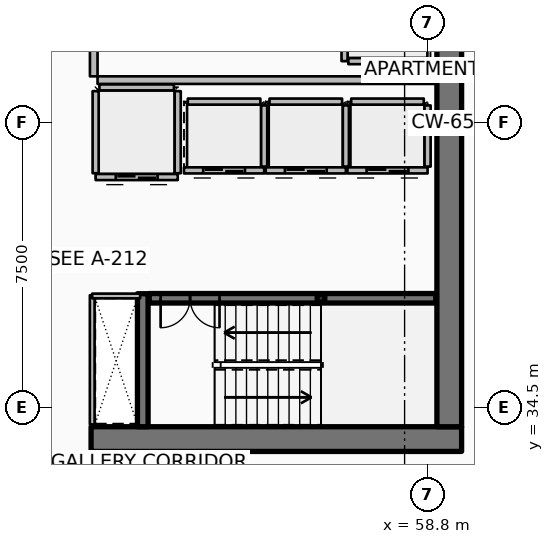
"""IFC4 building model, lengths in metres.
Left out: names, types, materials, properties, quantities, classifications, styles, units other than length and angle.
Written with IfcOpenShell. Run it as: python <this file> out.ifc"""

import sys

from ifc_helpers import new_model, si_unit, direction, frame, frame_2d, origin, origin_2d, place, context, subcontext, project, spatial, rectangle, hollow_rectangle, extrude, element, fill, save


model = new_model("IFC4")
c1 = context("Model", 3, precision=1e-05, world=origin(), true_north=direction((0.0, 1.0)))
c2 = subcontext(c1, "Body", "Model", "MODEL_VIEW")
j1 = project(units=[si_unit("LENGTHUNIT", "METRE"), si_unit("PLANEANGLEUNIT", "RADIAN")], contexts=[c1])
p1 = place(None, origin())
s1 = spatial("IfcSite", under=j1, at=p1, CompositionType="ELEMENT")
p2 = place(p1, origin())
s2 = spatial("IfcBuilding", under=s1, at=p2, CompositionType="ELEMENT")
p3 = place(p2, frame((0.0, 0.0, 252.1)))
s3 = spatial("IfcBuildingStorey", under=s2, at=p3, CompositionType="ELEMENT", Elevation=252.1)
p4 = place(p3, frame((49.95, 33.675, 0.0), z_axis=(0.0, 0.0, 1.0), x_axis=(1.0, 0.0, 0.0)))
e1 = element("IfcWall", 1, at=p4, inside=s3, PredefinedType="SHEAR", context=c2, shape_type="SweptSolid", body=[
    extrude(rectangle(XDim=9.75, YDim=0.65, at=frame_2d((4.875, 0.0))), origin(), (0.0, 0.0, 1.0), 3.85),
])
p5 = place(p3, frame((59.375, 34.0, 0.0), z_axis=(0.0, 0.0, 1.0), x_axis=(0.0, 1.0, 0.0)))
e2 = element("IfcWall", 2, at=p5, inside=s3, PredefinedType="SHEAR", context=c2, shape_type="SweptSolid", body=[
    extrude(rectangle(XDim=16.0, YDim=0.65, at=frame_2d((8.0, 0.0))), origin(), (0.0, 0.0, 1.0), 3.85),
])
p6 = place(p3, frame((51.31, 34.0, 0.0), z_axis=(0.0, 0.0, 1.0), x_axis=(0.0, 1.0, 0.0)))
e3 = element("IfcWall", 3, at=p6, inside=s3, PredefinedType="SHEAR", context=c2, shape_type="SweptSolid", body=[
    extrude(rectangle(XDim=3.5, YDim=0.28, at=frame_2d((1.75, 0.0))), origin(), (0.0, 0.0, 1.0), 3.85),
])
p7 = place(p3, frame((56.0, 37.38, 0.0), z_axis=(0.0, 0.0, 1.0), x_axis=(1.0, 0.0, 0.0)))
e4 = element("IfcColumn", 4, at=p7, inside=s3, PredefinedType="COLUMN", context=c2, shape_type="SweptSolid", body=[
    extrude(hollow_rectangle(XDim=0.2, YDim=0.2, WallThickness=0.01, InnerFilletRadius=0.01, OuterFilletRadius=0.02, at=origin_2d()), origin(), (0.0, 0.0, 1.0), 1.72),
])
p8 = place(p3, frame((51.48, 37.38, 0.0), z_axis=(0.0, 0.0, 1.0), x_axis=(1.0, 0.0, 0.0)))
e5 = element("IfcWall", 5, at=p8, inside=s3, PredefinedType="SOLIDWALL", context=c2, shape_type="SweptSolid", body=[
    extrude(rectangle(XDim=7.54, YDim=0.25, at=frame_2d((3.77, 0.0))), origin(), (0.0, 0.0, 1.0), 3.59),
])
p9 = place(p8, frame((0.3, 0.0, 0.0)))
e6 = element("IfcOpeningElement", 6, at=p9, cuts=e5, PredefinedType="OPENING", context=c2, shape_type="SweptSolid", body=[
    extrude(rectangle(XDim=1.55, YDim=2.15, at=frame_2d((0.775, 1.075))), frame((0.0, 0.135, 0.0), z_axis=(0.0, -1.0, 0.0), x_axis=(1.0, 0.0, 0.0)), (0.0, 0.0, 1.0), 0.27),
])
p10 = place(p3, frame((54.505, 40.745, 0.0), z_axis=(0.0, 0.0, 1.0), x_axis=(-1.0, 0.0, 0.0)))
e7 = element("IfcWall", 7, at=p10, inside=s3, PredefinedType="PARTITIONING", context=c2, shape_type="SweptSolid", body=[
    extrude(rectangle(XDim=2.11, YDim=0.16, at=frame_2d((1.055, 0.0))), origin(), (0.0, 0.0, 1.0), 3.59),
])
p11 = place(p10, frame((0.505, 0.0, 0.0)))
e8 = element("IfcOpeningElement", 8, at=p11, cuts=e7, PredefinedType="OPENING", context=c2, shape_type="SweptSolid", body=[
    extrude(rectangle(XDim=1.1, YDim=2.1, at=frame_2d((0.55, 1.05))), frame((0.0, 0.09, 0.0), z_axis=(0.0, -1.0, 0.0), x_axis=(1.0, 0.0, 0.0)), (0.0, 0.0, 1.0), 0.18),
])
p12 = place(p3, frame((54.505, 40.845, 0.0), z_axis=(0.0, 0.0, 1.0), x_axis=(0.0, 1.0, 0.0)))
e9 = element("IfcWall", 9, at=p12, inside=s3, PredefinedType="PARTITIONING", context=c2, shape_type="SweptSolid", body=[
    extrude(rectangle(XDim=1.61, YDim=0.16, at=frame_2d((0.805, 0.0))), origin(), (0.0, 0.0, 1.0), 3.59),
])
p13 = place(p3, frame((52.495, 42.555, 0.0), z_axis=(0.0, 0.0, 1.0), x_axis=(1.0, 0.0, 0.0)))
e10 = element("IfcWall", 10, at=p13, inside=s3, PredefinedType="PARTITIONING", context=c2, shape_type="SweptSolid", body=[
    extrude(rectangle(XDim=1.91, YDim=0.16, at=frame_2d((0.955, 0.0))), origin(), (0.0, 0.0, 1.0), 3.59),
])
p14 = place(p3, frame((56.655, 40.745, 0.0), z_axis=(0.0, 0.0, 1.0), x_axis=(-1.0, 0.0, 0.0)))
e11 = element("IfcWall", 11, at=p14, inside=s3, PredefinedType="PARTITIONING", context=c2, shape_type="SweptSolid", body=[
    extrude(rectangle(XDim=2.11, YDim=0.16, at=frame_2d((1.055, 0.0))), origin(), (0.0, 0.0, 1.0), 3.59),
])
p15 = place(p14, frame((0.505, 0.0, 0.0)))
e12 = element("IfcOpeningElement", 12, at=p15, cuts=e11, PredefinedType="OPENING", context=c2, shape_type="SweptSolid", body=[
    extrude(rectangle(XDim=1.1, YDim=2.1, at=frame_2d((0.55, 1.05))), frame((0.0, 0.09, 0.0), z_axis=(0.0, -1.0, 0.0), x_axis=(1.0, 0.0, 0.0)), (0.0, 0.0, 1.0), 0.18),
])
p16 = place(p3, frame((56.655, 40.845, 0.0), z_axis=(0.0, 0.0, 1.0), x_axis=(0.0, 1.0, 0.0)))
e13 = element("IfcWall", 13, at=p16, inside=s3, PredefinedType="PARTITIONING", context=c2, shape_type="SweptSolid", body=[
    extrude(rectangle(XDim=1.61, YDim=0.16, at=frame_2d((0.805, 0.0))), origin(), (0.0, 0.0, 1.0), 3.59),
])
p17 = place(p3, frame((54.645, 42.555, 0.0), z_axis=(0.0, 0.0, 1.0), x_axis=(1.0, 0.0, 0.0)))
e14 = element("IfcWall", 14, at=p17, inside=s3, PredefinedType="PARTITIONING", context=c2, shape_type="SweptSolid", body=[
    extrude(rectangle(XDim=1.91, YDim=0.16, at=frame_2d((0.955, 0.0))), origin(), (0.0, 0.0, 1.0), 3.59),
])
p18 = place(p3, frame((58.805, 40.745, 0.0), z_axis=(0.0, 0.0, 1.0), x_axis=(-1.0, 0.0, 0.0)))
e15 = element("IfcWall", 15, at=p18, inside=s3, PredefinedType="PARTITIONING", context=c2, shape_type="SweptSolid", body=[
    extrude(rectangle(XDim=2.11, YDim=0.16, at=frame_2d((1.055, 0.0))), origin(), (0.0, 0.0, 1.0), 3.59),
])
p19 = place(p18, frame((0.505, 0.0, 0.0)))
e16 = element("IfcOpeningElement", 16, at=p19, cuts=e15, PredefinedType="OPENING", context=c2, shape_type="SweptSolid", body=[
    extrude(rectangle(XDim=1.1, YDim=2.1, at=frame_2d((0.55, 1.05))), frame((0.0, 0.09, 0.0), z_axis=(0.0, -1.0, 0.0), x_axis=(1.0, 0.0, 0.0)), (0.0, 0.0, 1.0), 0.18),
])
p20 = place(p3, frame((58.805, 40.845, 0.0), z_axis=(0.0, 0.0, 1.0), x_axis=(0.0, 1.0, 0.0)))
e17 = element("IfcWall", 17, at=p20, inside=s3, PredefinedType="PARTITIONING", context=c2, shape_type="SweptSolid", body=[
    extrude(rectangle(XDim=1.61, YDim=0.16, at=frame_2d((0.805, 0.0))), origin(), (0.0, 0.0, 1.0), 3.59),
])
p21 = place(p3, frame((56.795, 42.555, 0.0), z_axis=(0.0, 0.0, 1.0), x_axis=(1.0, 0.0, 0.0)))
e18 = element("IfcWall", 18, at=p21, inside=s3, PredefinedType="PARTITIONING", context=c2, shape_type="SweptSolid", body=[
    extrude(rectangle(XDim=1.91, YDim=0.16, at=frame_2d((0.955, 0.0))), origin(), (0.0, 0.0, 1.0), 3.59),
])
p22 = place(p3, frame((56.62, 46.08, 0.0), z_axis=(0.0, 0.0, 1.0), x_axis=(0.0, -1.0, 0.0)))
e19 = element("IfcWall", 19, at=p22, inside=s3, PredefinedType="PARTITIONING", context=c2, shape_type="SweptSolid", body=[
    extrude(rectangle(XDim=2.46, YDim=0.16, at=frame_2d((1.23, 0.0))), origin(), (0.0, 0.0, 1.0), 3.59),
])
p23 = place(p22, frame((0.68, 0.0, 0.0)))
e20 = element("IfcOpeningElement", 20, at=p23, cuts=e19, PredefinedType="OPENING", context=c2, shape_type="SweptSolid", body=[
    extrude(rectangle(XDim=1.1, YDim=2.1, at=frame_2d((0.55, 1.05))), frame((0.0, 0.09, 0.0), z_axis=(0.0, -1.0, 0.0), x_axis=(1.0, 0.0, 0.0)), (0.0, 0.0, 1.0), 0.18),
])
p24 = place(p3, frame((56.72, 43.62, 0.0), z_axis=(0.0, 0.0, 1.0), x_axis=(1.0, 0.0, 0.0)))
e21 = element("IfcWall", 21, at=p24, inside=s3, PredefinedType="PARTITIONING", context=c2, shape_type="SweptSolid", body=[
    extrude(rectangle(XDim=2.06, YDim=0.16, at=frame_2d((1.03, 0.0))), origin(), (0.0, 0.0, 1.0), 3.59),
])
p25 = place(p3, frame((52.23, 40.57, 0.0), z_axis=(0.0, 0.0, 1.0), x_axis=(-1.0, 0.0, 0.0)))
e22 = element("IfcWall", 22, at=p25, inside=s3, PredefinedType="PARTITIONING", context=c2, shape_type="SweptSolid", body=[
    extrude(rectangle(XDim=2.16, YDim=0.16, at=frame_2d((1.08, 0.0))), origin(), (0.0, 0.0, 1.0), 3.59),
])
p26 = place(p25, frame((0.53, 0.0, 0.0)))
e23 = element("IfcOpeningElement", 23, at=p26, cuts=e22, PredefinedType="OPENING", context=c2, shape_type="SweptSolid", body=[
    extrude(rectangle(XDim=1.1, YDim=2.1, at=frame_2d((0.55, 1.05))), frame((0.0, 0.09, 0.0), z_axis=(0.0, -1.0, 0.0), x_axis=(1.0, 0.0, 0.0)), (0.0, 0.0, 1.0), 0.18),
])
for number, where, z_axis, x_axis in (
    (24, (52.23, 40.67, 0.0), (0.0, 0.0, 1.0), (0.0, 1.0, 0.0)),
    (25, (50.07, 40.67, 0.0), (0.0, 0.0, 1.0), (0.0, 1.0, 0.0)),
):
    element("IfcWall", number, at=place(p3, frame(where, z_axis=z_axis, x_axis=x_axis)), inside=s3, PredefinedType="PARTITIONING", context=c2, shape_type="SweptSolid", body=[
        extrude(rectangle(XDim=2.16, YDim=0.16, at=frame_2d((1.08, 0.0))), origin(), (0.0, 0.0, 1.0), 3.59),
    ])
p27 = place(p3, frame((50.17, 42.93, 0.0), z_axis=(0.0, 0.0, 1.0), x_axis=(1.0, 0.0, 0.0)))
e26 = element("IfcWall", 26, at=p27, inside=s3, PredefinedType="PARTITIONING", context=c2, shape_type="SweptSolid", body=[
    extrude(rectangle(XDim=1.96, YDim=0.16, at=frame_2d((0.98, 0.0))), origin(), (0.0, 0.0, 1.0), 3.59),
])
p28 = place(p3, frame((50.12, 43.12, 0.0), z_axis=(0.0, 0.0, 1.0), x_axis=(1.0, 0.0, 0.0)))
e27 = element("IfcWall", 27, at=p28, inside=s3, PredefinedType="PARTITIONING", context=c2, shape_type="SweptSolid", body=[
    extrude(rectangle(XDim=8.88, YDim=0.2, at=frame_2d((4.44, 0.0))), origin(), (0.0, 0.0, 1.0), 3.59),
])
p29 = place(p3, frame((50.02, 43.22, 0.0), z_axis=(0.0, 0.0, 1.0), x_axis=(0.0, 1.0, 0.0)))
e28 = element("IfcWall", 28, at=p29, inside=s3, PredefinedType="PARTITIONING", context=c2, shape_type="SweptSolid", body=[
    extrude(rectangle(XDim=3.3, YDim=0.2, at=frame_2d((1.65, 0.0))), origin(), (0.0, 0.0, 1.0), 3.59),
])
p30 = place(p29, frame((1.125, 0.0, 0.0)))
e29 = element("IfcOpeningElement", 29, at=p30, cuts=e28, PredefinedType="OPENING", context=c2, shape_type="SweptSolid", body=[
    extrude(rectangle(XDim=1.05, YDim=2.1, at=frame_2d((0.525, 1.05))), frame((0.0, 0.11, 0.0), z_axis=(0.0, -1.0, 0.0), x_axis=(1.0, 0.0, 0.0)), (0.0, 0.0, 1.0), 0.22),
])
p31 = place(p3, frame((49.98, 34.06, 0.0), z_axis=(0.0, 0.0, 1.0), x_axis=(0.0, 1.0, 0.0)))
e30 = element("IfcWall", 30, at=p31, inside=s3, PredefinedType="PARTITIONING", context=c2, shape_type="SweptSolid", body=[
    extrude(rectangle(XDim=3.4, YDim=0.125, at=frame_2d((1.7, 0.0))), origin(), (0.0, 0.0, 1.0), 3.03),
])
p32 = place(p3, frame((49.98, 37.44, 0.0), z_axis=(0.0, 0.0, 1.0), x_axis=(1.0, 0.0, 0.0)))
e31 = element("IfcWall", 31, at=p32, inside=s3, PredefinedType="PARTITIONING", context=c2, shape_type="SweptSolid", body=[
    extrude(rectangle(XDim=1.26, YDim=0.125, at=frame_2d((0.63, 0.0))), origin(), (0.0, 0.0, 1.0), 3.03),
])
p33 = place(p9, origin())
e32 = element("IfcDoor", 32, at=p33, inside=s3, OperationType="DOUBLE_DOOR_SINGLE_SWING", PredefinedType="DOOR", context=c2, shape_type="SweptSolid", body=[
    extrude(rectangle(XDim=1.55, YDim=2.15, at=frame_2d((0.775, 1.075))), frame((0.0, 0.025, 0.0), z_axis=(0.0, -1.0, 0.0), x_axis=(1.0, 0.0, 0.0)), (0.0, 0.0, 1.0), 0.05),
])
fill(e6, e32)
p34 = place(p11, origin())
e33 = element("IfcDoor", 33, at=p34, inside=s3, OperationType="DOUBLE_DOOR_SLIDING", PredefinedType="DOOR", context=c2, shape_type="SweptSolid", body=[
    extrude(rectangle(XDim=1.1, YDim=2.1, at=frame_2d((0.55, 1.05))), frame((0.0, 0.025, 0.0), z_axis=(0.0, -1.0, 0.0), x_axis=(1.0, 0.0, 0.0)), (0.0, 0.0, 1.0), 0.05),
])
fill(e8, e33)
p35 = place(p15, origin())
e34 = element("IfcDoor", 34, at=p35, inside=s3, OperationType="DOUBLE_DOOR_SLIDING", PredefinedType="DOOR", context=c2, shape_type="SweptSolid", body=[
    extrude(rectangle(XDim=1.1, YDim=2.1, at=frame_2d((0.55, 1.05))), frame((0.0, 0.025, 0.0), z_axis=(0.0, -1.0, 0.0), x_axis=(1.0, 0.0, 0.0)), (0.0, 0.0, 1.0), 0.05),
])
fill(e12, e34)
p36 = place(p19, origin())
e35 = element("IfcDoor", 35, at=p36, inside=s3, OperationType="DOUBLE_DOOR_SLIDING", PredefinedType="DOOR", context=c2, shape_type="SweptSolid", body=[
    extrude(rectangle(XDim=1.1, YDim=2.1, at=frame_2d((0.55, 1.05))), frame((0.0, 0.025, 0.0), z_axis=(0.0, -1.0, 0.0), x_axis=(1.0, 0.0, 0.0)), (0.0, 0.0, 1.0), 0.05),
])
fill(e16, e35)
p37 = place(p26, origin())
e36 = element("IfcDoor", 36, at=p37, inside=s3, OperationType="DOUBLE_DOOR_SLIDING", PredefinedType="DOOR", context=c2, shape_type="SweptSolid", body=[
    extrude(rectangle(XDim=1.1, YDim=2.1, at=frame_2d((0.55, 1.05))), frame((0.0, 0.025, 0.0), z_axis=(0.0, -1.0, 0.0), x_axis=(1.0, 0.0, 0.0)), (0.0, 0.0, 1.0), 0.05),
])
fill(e23, e36)
save(model, sys.argv[1])
